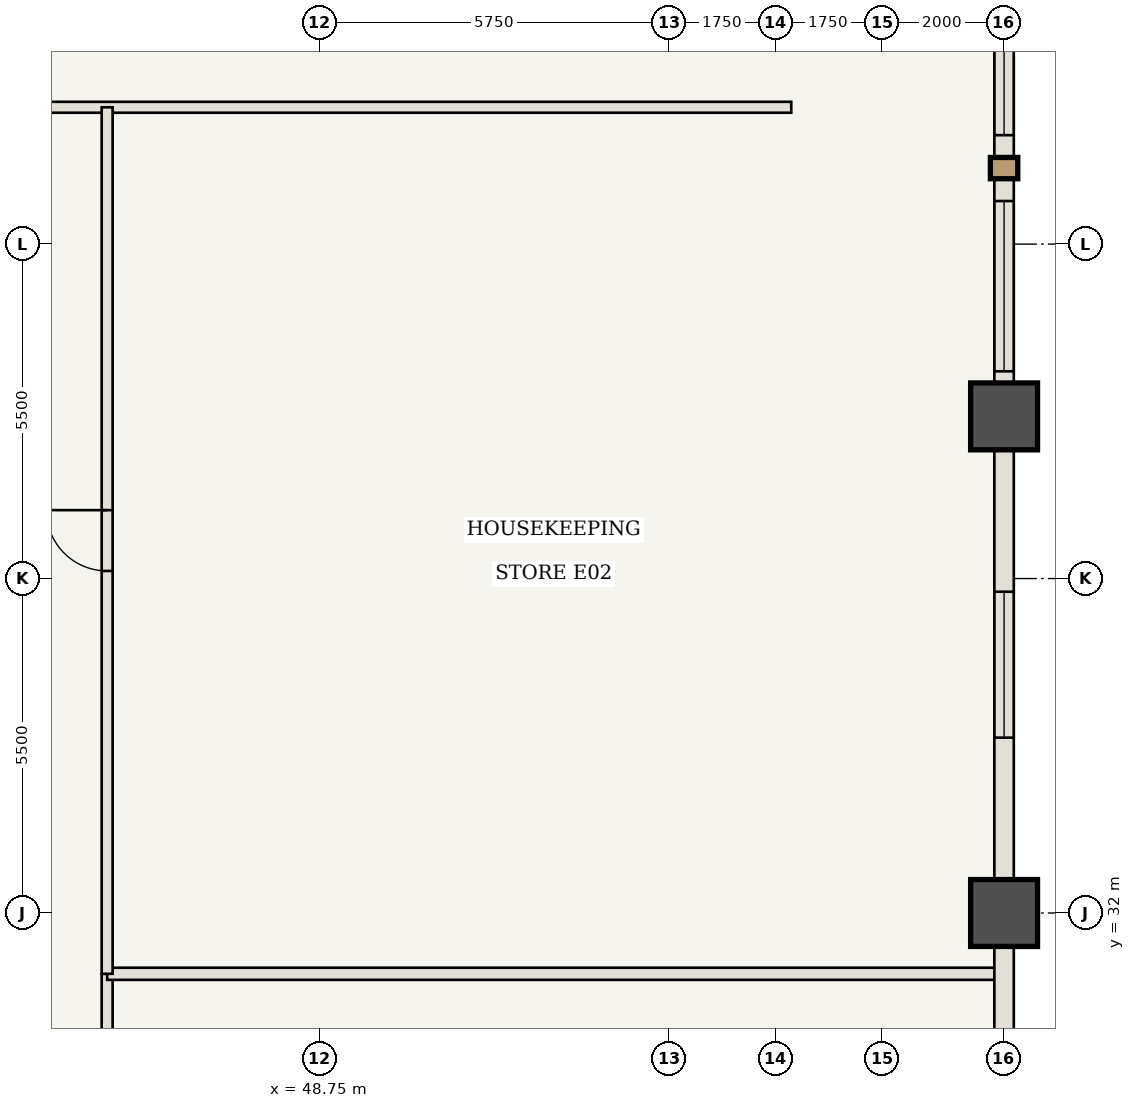
"""IFC4 building model, lengths in metres.
Left out: names, types, materials, properties, quantities, classifications, styles, units other than length and angle.
Written with IfcOpenShell. Run it as: python <this file> out.ifc"""

import sys

from ifc_helpers import new_model, si_unit, direction, frame, frame_2d, origin, origin_2d, place, context, subcontext, project, spatial, rectangle, extrude, element, fill, save


model = new_model("IFC4")
c1 = context("Model", 3, precision=1e-05, world=origin(), true_north=direction((0.0, 1.0)))
c2 = subcontext(c1, "Body", "Model", "MODEL_VIEW")
j1 = project(units=[si_unit("LENGTHUNIT", "METRE"), si_unit("PLANEANGLEUNIT", "RADIAN")], contexts=[c1])
p1 = place(None, origin())
s1 = spatial("IfcSite", under=j1, at=p1, CompositionType="ELEMENT")
p2 = place(p1, origin())
s2 = spatial("IfcBuilding", under=s1, at=p2, CompositionType="ELEMENT")
p3 = place(p2, frame((0.0, 0.0, 82.25)))
s3 = spatial("IfcBuildingStorey", under=s2, at=p3, CompositionType="ELEMENT", Elevation=82.25)
for number, where, z_axis, x_axis in (
    (1, (60.0, 32.0, 0.0), (0.0, 0.0, 1.0), (1.0, 0.0, 0.0)),
    (2, (60.0, 40.167, 0.0), (0.0, 0.0, 1.0), (1.0, 0.0, 0.0)),
):
    element("IfcColumn", number, at=place(p3, frame(where, z_axis=z_axis, x_axis=x_axis)), inside=s3, PredefinedType="COLUMN", context=c2, shape_type="SweptSolid", body=[
        extrude(rectangle(XDim=1.1, YDim=1.1, at=origin_2d()), origin(), (0.0, 0.0, 1.0), 3.5),
    ])
p4 = place(p3, frame((36.8, 45.25, 0.0), z_axis=(0.0, 0.0, 1.0), x_axis=(1.0, 0.0, 0.0)))
e3 = element("IfcWall", 3, at=p4, inside=s3, PredefinedType="STANDARD", context=c2, shape_type="SweptSolid", body=[
    extrude(rectangle(XDim=19.7, YDim=0.18, at=frame_2d((9.85, 0.0))), origin(), (0.0, 0.0, 1.0), 3.32),
])
p5 = place(p4, frame((3.7, 0.0, 0.0)))
e4 = element("IfcOpeningElement", 4, at=p5, cuts=e3, PredefinedType="OPENING", context=c2, shape_type="SweptSolid", body=[
    extrude(rectangle(XDim=1.0, YDim=2.15, at=frame_2d((0.5, 1.075))), frame((0.0, 0.1, 0.0), z_axis=(0.0, -1.0, 0.0), x_axis=(1.0, 0.0, 0.0)), (0.0, 0.0, 1.0), 0.2),
])
p6 = place(p3, frame((45.25, 18.75, 0.0), z_axis=(0.0, 0.0, 1.0), x_axis=(0.0, 1.0, 0.0)))
e5 = element("IfcWall", 5, at=p6, inside=s3, PredefinedType="STANDARD", context=c2, shape_type="SweptSolid", body=[
    extrude(rectangle(XDim=12.25, YDim=0.18, at=frame_2d((6.125, 0.0))), origin(), (0.0, 0.0, 1.0), 3.32),
])
p7 = place(p6, frame((5.625, 0.0, 0.0)))
e6 = element("IfcOpeningElement", 6, at=p7, cuts=e5, PredefinedType="OPENING", context=c2, shape_type="SweptSolid", body=[
    extrude(rectangle(XDim=1.0, YDim=2.15, at=frame_2d((0.5, 1.075))), frame((0.0, 0.1, 0.0), z_axis=(0.0, -1.0, 0.0), x_axis=(1.0, 0.0, 0.0)), (0.0, 0.0, 1.0), 0.2),
])
p8 = place(p3, frame((45.25, 31.0, 0.0), z_axis=(0.0, 0.0, 1.0), x_axis=(1.0, 0.0, 0.0)))
e7 = element("IfcWall", 7, at=p8, inside=s3, PredefinedType="STANDARD", context=c2, shape_type="SweptSolid", body=[
    extrude(rectangle(XDim=14.69, YDim=0.2, at=frame_2d((7.345, 0.0))), origin(), (0.0, 0.0, 1.0), 3.32),
])
p9 = place(p3, frame((45.25, 31.0, 0.0), z_axis=(0.0, 0.0, 1.0), x_axis=(0.0, 1.0, 0.0)))
e8 = element("IfcWall", 8, at=p9, inside=s3, PredefinedType="STANDARD", context=c2, shape_type="SweptSolid", body=[
    extrude(rectangle(XDim=14.25, YDim=0.18, at=frame_2d((7.125, 0.0))), origin(), (0.0, 0.0, 1.0), 3.32),
])
p10 = place(p9, frame((6.625, 0.0, 0.0)))
e9 = element("IfcOpeningElement", 9, at=p10, cuts=e8, PredefinedType="OPENING", context=c2, shape_type="SweptSolid", body=[
    extrude(rectangle(XDim=1.0, YDim=2.15, at=frame_2d((0.5, 1.075))), frame((0.0, 0.1, 0.0), z_axis=(0.0, -1.0, 0.0), x_axis=(1.0, 0.0, 0.0)), (0.0, 0.0, 1.0), 0.2),
])
p11 = place(p3, frame((60.0, 32.0, 0.0), z_axis=(0.0, 0.0, 1.0), x_axis=(0.0, -1.0, 0.0)))
e10 = element("IfcWall", 10, at=p11, inside=s3, PredefinedType="USERDEFINED", context=c2, shape_type="SweptSolid", body=[
    extrude(rectangle(XDim=8.167, YDim=0.32, at=frame_2d((4.083, 0.0))), origin(), (0.0, 0.0, 1.0), 2.52),
])
p12 = place(p11, frame((3.233, 0.0, 0.85)))
e11 = element("IfcOpeningElement", 11, at=p12, cuts=e10, PredefinedType="OPENING", context=c2, shape_type="SweptSolid", body=[
    extrude(rectangle(XDim=2.4, YDim=1.47, at=frame_2d((1.2, 0.735))), frame((0.0, 0.17, 0.0), z_axis=(0.0, -1.0, 0.0), x_axis=(1.0, 0.0, 0.0)), (0.0, 0.0, 1.0), 0.34),
])
p13 = place(p3, frame((60.0, 40.167, 0.0), z_axis=(0.0, 0.0, 1.0), x_axis=(0.0, -1.0, 0.0)))
e12 = element("IfcWall", 12, at=p13, inside=s3, PredefinedType="USERDEFINED", context=c2, shape_type="SweptSolid", body=[
    extrude(rectangle(XDim=8.167, YDim=0.32, at=frame_2d((4.083, 0.0))), origin(), (0.0, 0.0, 1.0), 2.52),
])
p14 = place(p13, frame((2.883, 0.0, 0.85)))
e13 = element("IfcOpeningElement", 13, at=p14, cuts=e12, PredefinedType="OPENING", context=c2, shape_type="SweptSolid", body=[
    extrude(rectangle(XDim=2.4, YDim=1.47, at=frame_2d((1.2, 0.735))), frame((0.0, 0.17, 0.0), z_axis=(0.0, -1.0, 0.0), x_axis=(1.0, 0.0, 0.0)), (0.0, 0.0, 1.0), 0.34),
])
p15 = place(p3, frame((60.0, 48.333, 0.0), z_axis=(0.0, 0.0, 1.0), x_axis=(0.0, -1.0, 0.0)))
e14 = element("IfcWall", 14, at=p15, inside=s3, PredefinedType="USERDEFINED", context=c2, shape_type="SweptSolid", body=[
    extrude(rectangle(XDim=8.167, YDim=0.32, at=frame_2d((4.083, 0.0))), origin(), (0.0, 0.0, 1.0), 2.52),
])
p16 = place(p15, frame((0.742, 0.0, 0.85)))
e15 = element("IfcOpeningElement", 15, at=p16, cuts=e14, PredefinedType="OPENING", context=c2, shape_type="SweptSolid", body=[
    extrude(rectangle(XDim=2.8, YDim=1.47, at=frame_2d((1.4, 0.735))), frame((0.0, 0.17, 0.0), z_axis=(0.0, -1.0, 0.0), x_axis=(1.0, 0.0, 0.0)), (0.0, 0.0, 1.0), 0.34),
])
p17 = place(p15, frame((4.625, 0.0, 0.85)))
e16 = element("IfcOpeningElement", 16, at=p17, cuts=e14, PredefinedType="OPENING", context=c2, shape_type="SweptSolid", body=[
    extrude(rectangle(XDim=2.8, YDim=1.47, at=frame_2d((1.4, 0.735))), frame((0.0, 0.17, 0.0), z_axis=(0.0, -1.0, 0.0), x_axis=(1.0, 0.0, 0.0)), (0.0, 0.0, 1.0), 0.34),
])
p18 = place(p10, origin())
e17 = element("IfcDoor", 17, at=p18, inside=s3, OperationType="SINGLE_SWING_RIGHT", PredefinedType="DOOR", context=c2, shape_type="SweptSolid", body=[
    extrude(rectangle(XDim=1.0, YDim=2.15, at=frame_2d((0.5, 1.075))), frame((0.0, 0.025, 0.0), z_axis=(0.0, -1.0, 0.0), x_axis=(1.0, 0.0, 0.0)), (0.0, 0.0, 1.0), 0.05),
])
fill(e9, e17)
p19 = place(p14, origin())
e18 = element("IfcWindow", 18, at=p19, inside=s3, PartitioningType="SINGLE_PANEL", PredefinedType="WINDOW", context=c2, shape_type="SweptSolid", body=[
    extrude(rectangle(XDim=2.4, YDim=1.47, at=frame_2d((1.2, 0.735))), frame((0.0, 0.03, 0.0), z_axis=(0.0, -1.0, 0.0), x_axis=(1.0, 0.0, 0.0)), (0.0, 0.0, 1.0), 0.06),
])
fill(e13, e18)
p20 = place(p16, origin())
e19 = element("IfcWindow", 19, at=p20, inside=s3, PartitioningType="SINGLE_PANEL", PredefinedType="WINDOW", context=c2, shape_type="SweptSolid", body=[
    extrude(rectangle(XDim=2.8, YDim=1.47, at=frame_2d((1.4, 0.735))), frame((0.0, 0.03, 0.0), z_axis=(0.0, -1.0, 0.0), x_axis=(1.0, 0.0, 0.0)), (0.0, 0.0, 1.0), 0.06),
])
fill(e15, e19)
p21 = place(p17, origin())
e20 = element("IfcWindow", 20, at=p21, inside=s3, PartitioningType="SINGLE_PANEL", PredefinedType="WINDOW", context=c2, shape_type="SweptSolid", body=[
    extrude(rectangle(XDim=2.8, YDim=1.47, at=frame_2d((1.4, 0.735))), frame((0.0, 0.03, 0.0), z_axis=(0.0, -1.0, 0.0), x_axis=(1.0, 0.0, 0.0)), (0.0, 0.0, 1.0), 0.06),
])
fill(e16, e20)
save(model, sys.argv[1])
